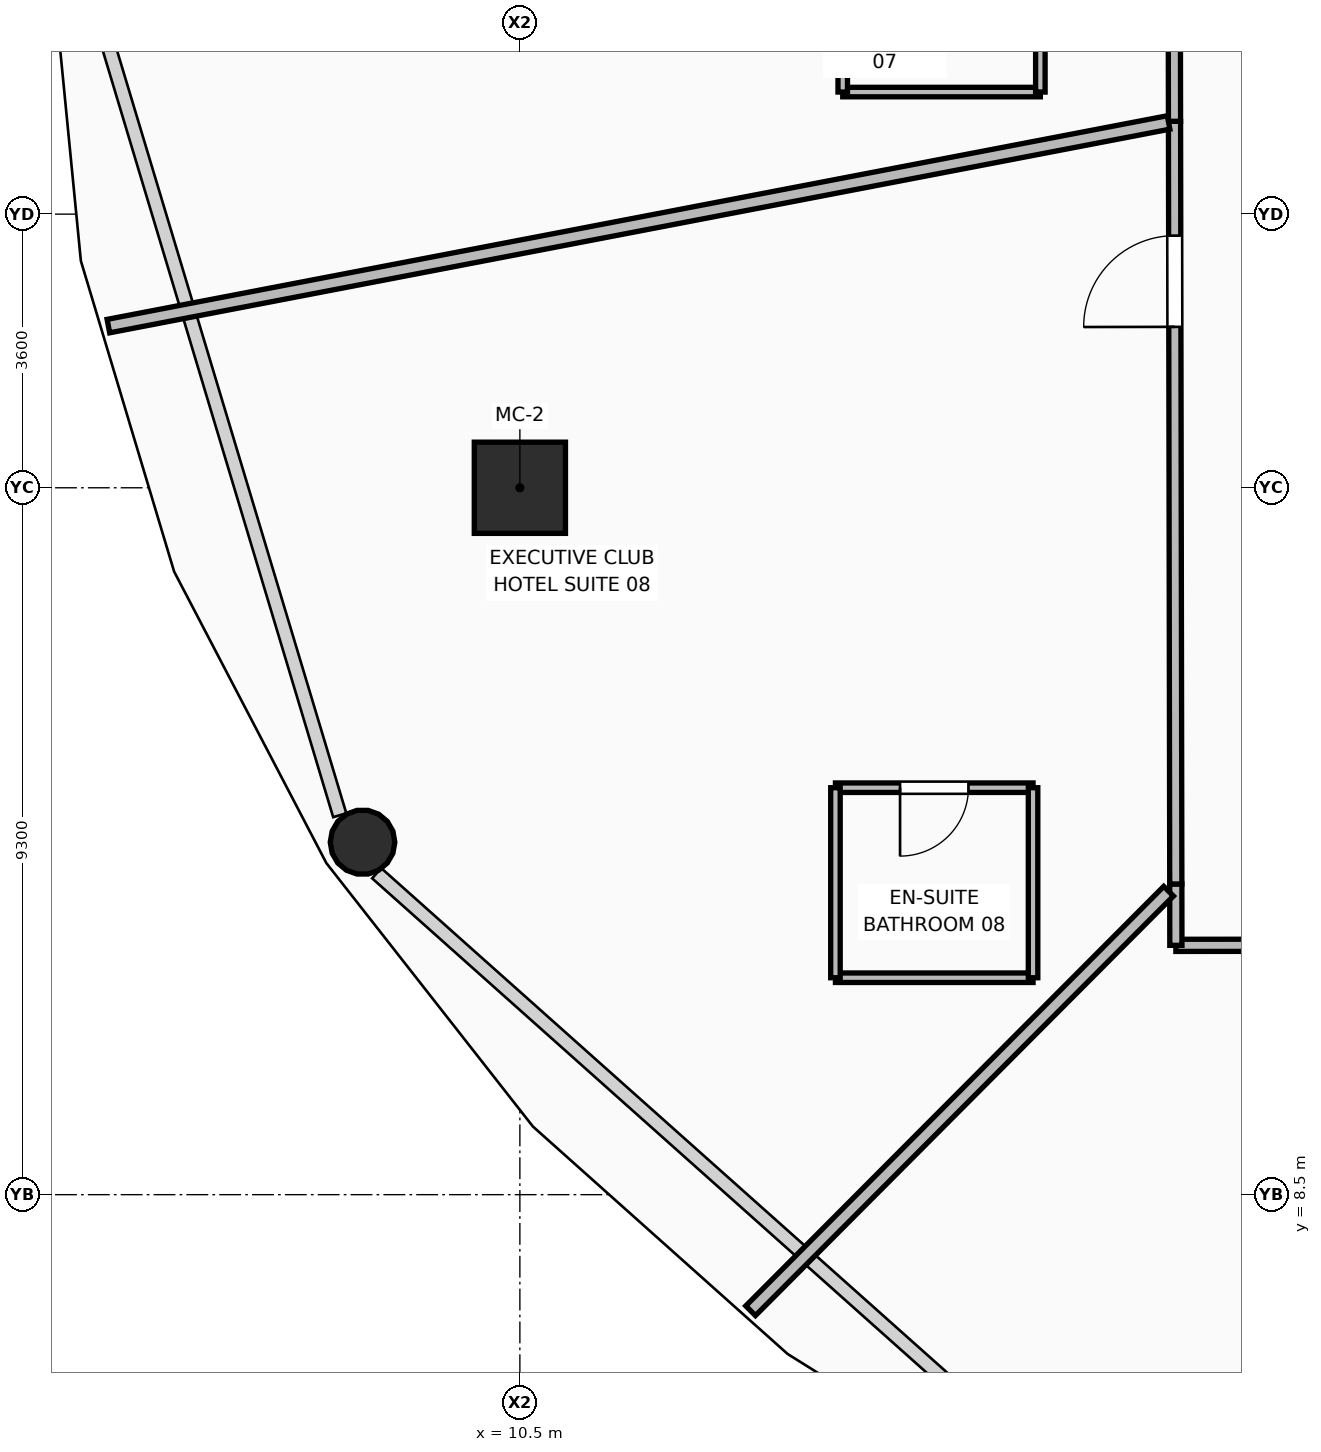
"""IFC4 building model, lengths in metres.
Left out: names, types, materials, properties, quantities, classifications, styles, units other than length and angle.
Written with IfcOpenShell. Run it as: python <this file> out.ifc"""

import sys

from ifc_helpers import new_model, si_unit, direction, frame, frame_2d, origin, origin_2d, place, context, subcontext, project, spatial, rectangle, hollow_rectangle, hollow_circle, extrude, element, fill, save


model = new_model("IFC4")
c1 = context("Model", 3, precision=1e-05, world=origin(), true_north=direction((0.0, 1.0)))
c2 = subcontext(c1, "Body", "Model", "MODEL_VIEW")
j1 = project(units=[si_unit("LENGTHUNIT", "METRE"), si_unit("PLANEANGLEUNIT", "RADIAN")], contexts=[c1])
p1 = place(None, origin())
s1 = spatial("IfcSite", under=j1, at=p1, CompositionType="ELEMENT")
p2 = place(p1, origin())
s2 = spatial("IfcBuilding", under=s1, at=p2, CompositionType="ELEMENT")
p3 = place(p2, frame((0.0, 0.0, 49.5)))
s3 = spatial("IfcBuildingStorey", under=s2, at=p3, CompositionType="ELEMENT", Elevation=49.5)
p4 = place(p3, frame((10.5, 17.8, 0.0), z_axis=(0.0, 0.0, 1.0), x_axis=(1.0, 0.0, 0.0)))
e1 = element("IfcColumn", 1, at=p4, inside=s3, PredefinedType="COLUMN", context=c2, shape_type="SweptSolid", body=[
    extrude(hollow_rectangle(XDim=1.2, YDim=1.2, WallThickness=0.045, at=origin_2d()), origin(), (0.0, 0.0, 1.0), 3.75),
])
p5 = place(p3, frame((8.43, 13.137, 0.0), z_axis=(0.0, 0.0, 1.0), x_axis=(1.0, 0.0, 0.0)))
e2 = element("IfcColumn", 2, at=p5, inside=s3, PredefinedType="COLUMN", context=c2, shape_type="SweptSolid", body=[
    extrude(hollow_circle(Radius=0.425, WallThickness=0.04, at=origin_2d()), origin(), (0.0, 0.0, 1.0), 3.57),
])
p6 = place(p3, frame((29.963, 11.787, 0.0), z_axis=(0.0, 0.0, 1.0), x_axis=(-0.999999786378, -0.000653638826, 0.0)))
e3 = element("IfcWall", 3, at=p6, inside=s3, PredefinedType="PARTITIONING", context=c2, shape_type="SweptSolid", body=[
    extrude(rectangle(XDim=10.832, YDim=0.16, at=frame_2d((5.416, 0.0))), origin(), (0.0, 0.0, 1.0), 2.928),
])
p7 = place(p6, frame((4.89, 0.0, 0.0)))
e4 = element("IfcOpeningElement", 4, at=p7, cuts=e3, PredefinedType="OPENING", context=c2, shape_type="SweptSolid", body=[
    extrude(rectangle(XDim=1.2, YDim=2.1, at=frame_2d((0.6, 1.05))), frame((0.0, 0.09, 0.0), z_axis=(0.0, -1.0, 0.0), x_axis=(1.0, 0.0, 0.0)), (0.0, 0.0, 1.0), 0.18),
])
p8 = place(p3, frame((19.131, 11.78, 0.0), z_axis=(0.0, 0.0, 1.0), x_axis=(-0.001512857573, 0.99999885563, 0.0)))
e5 = element("IfcWall", 5, at=p8, inside=s3, PredefinedType="PARTITIONING", context=c2, shape_type="SweptSolid", body=[
    extrude(rectangle(XDim=0.807, YDim=0.16, at=frame_2d((0.403, 0.0))), origin(), (0.0, 0.0, 1.0), 3.55),
])
p9 = place(p3, frame((19.13, 12.587, 0.0), z_axis=(0.0, 0.0, 1.0), x_axis=(-0.001678829751, 0.999998590764, 0.0)))
e6 = element("IfcWall", 6, at=p9, inside=s3, PredefinedType="PARTITIONING", context=c2, shape_type="SweptSolid", body=[
    extrude(rectangle(XDim=10.034, YDim=0.16, at=frame_2d((5.017, 0.0))), origin(), (0.0, 0.0, 1.0), 2.928),
])
p10 = place(p9, frame((7.33, 0.0, 0.0)))
e7 = element("IfcOpeningElement", 7, at=p10, cuts=e6, PredefinedType="OPENING", context=c2, shape_type="SweptSolid", body=[
    extrude(rectangle(XDim=1.2, YDim=2.1, at=frame_2d((0.6, 1.05))), frame((0.0, 0.09, 0.0), z_axis=(0.0, -1.0, 0.0), x_axis=(1.0, 0.0, 0.0)), (0.0, 0.0, 1.0), 0.18),
])
p11 = place(p3, frame((19.113, 22.621, 0.0), z_axis=(0.0, 0.0, 1.0), x_axis=(-0.001579153183, 0.999998753137, 0.0)))
e8 = element("IfcWall", 8, at=p11, inside=s3, PredefinedType="PARTITIONING", context=c2, shape_type="SweptSolid", body=[
    extrude(rectangle(XDim=1.237, YDim=0.16, at=frame_2d((0.618, 0.0))), origin(), (0.0, 0.0, 1.0), 3.55),
])
p12 = place(p3, frame((19.035, 22.606, 0.0), z_axis=(0.0, 0.0, 1.0), x_axis=(-0.982052637136, -0.188607046247, 0.0)))
e9 = element("IfcWall", 9, at=p12, inside=s3, PredefinedType="PARTITIONING", context=c2, shape_type="SweptSolid", body=[
    extrude(rectangle(XDim=14.204, YDim=0.18, at=frame_2d((7.102, 0.0))), origin(), (0.0, 0.0, 1.0), 2.775),
])
p13 = place(p3, frame((19.035, 12.492, 0.0), z_axis=(0.0, 0.0, 1.0), x_axis=(-0.705820822029, -0.708390405913, 0.0)))
e10 = element("IfcWall", 10, at=p13, inside=s3, PredefinedType="PARTITIONING", context=c2, shape_type="SweptSolid", body=[
    extrude(rectangle(XDim=7.791, YDim=0.18, at=frame_2d((3.896, 0.0))), origin(), (0.0, 0.0, 1.0), 2.775),
])
p14 = place(p3, frame((14.748, 23.006, 0.0), z_axis=(0.0, 0.0, 1.0), x_axis=(1.0, 0.0, 0.0)))
e11 = element("IfcWall", 11, at=p14, inside=s3, PredefinedType="PARTITIONING", context=c2, shape_type="SweptSolid", body=[
    extrude(rectangle(XDim=2.6, YDim=0.125, at=frame_2d((1.3, 0.0))), origin(), (0.0, 0.0, 1.0), 3.55),
])
p15 = place(p3, frame((14.748, 23.006, 0.0), z_axis=(0.0, 0.0, 1.0), x_axis=(0.0, 1.0, 0.0)))
e12 = element("IfcWall", 12, at=p15, inside=s3, PredefinedType="PARTITIONING", context=c2, shape_type="SweptSolid", body=[
    extrude(rectangle(XDim=2.5, YDim=0.125, at=frame_2d((1.25, 0.0))), origin(), (0.0, 0.0, 1.0), 3.55),
])
p16 = place(p3, frame((17.348, 23.006, 0.0), z_axis=(0.0, 0.0, 1.0), x_axis=(0.0, 1.0, 0.0)))
e13 = element("IfcWall", 13, at=p16, inside=s3, PredefinedType="PARTITIONING", context=c2, shape_type="SweptSolid", body=[
    extrude(rectangle(XDim=2.5, YDim=0.125, at=frame_2d((1.25, 0.0))), origin(), (0.0, 0.0, 1.0), 3.55),
])
p17 = place(p16, frame((0.8, 0.0, 0.0)))
e14 = element("IfcOpeningElement", 14, at=p17, cuts=e13, PredefinedType="OPENING", context=c2, shape_type="SweptSolid", body=[
    extrude(rectangle(XDim=0.9, YDim=2.1, at=frame_2d((0.45, 1.05))), frame((0.0, 0.073, 0.0), z_axis=(0.0, -1.0, 0.0), x_axis=(1.0, 0.0, 0.0)), (0.0, 0.0, 1.0), 0.145),
])
p18 = place(p3, frame((14.652, 11.354, 0.0), z_axis=(0.0, 0.0, 1.0), x_axis=(1.0, 0.0, 0.0)))
e15 = element("IfcWall", 15, at=p18, inside=s3, PredefinedType="PARTITIONING", context=c2, shape_type="SweptSolid", body=[
    extrude(rectangle(XDim=2.6, YDim=0.125, at=frame_2d((1.3, 0.0))), origin(), (0.0, 0.0, 1.0), 3.55),
])
p19 = place(p3, frame((14.652, 13.854, 0.0), z_axis=(0.0, 0.0, 1.0), x_axis=(1.0, 0.0, 0.0)))
e16 = element("IfcWall", 16, at=p19, inside=s3, PredefinedType="PARTITIONING", context=c2, shape_type="SweptSolid", body=[
    extrude(rectangle(XDim=2.6, YDim=0.125, at=frame_2d((1.3, 0.0))), origin(), (0.0, 0.0, 1.0), 3.55),
])
p20 = place(p19, frame((0.85, 0.0, 0.0)))
e17 = element("IfcOpeningElement", 17, at=p20, cuts=e16, PredefinedType="OPENING", context=c2, shape_type="SweptSolid", body=[
    extrude(rectangle(XDim=0.9, YDim=2.1, at=frame_2d((0.45, 1.05))), frame((0.0, 0.073, 0.0), z_axis=(0.0, -1.0, 0.0), x_axis=(1.0, 0.0, 0.0)), (0.0, 0.0, 1.0), 0.145),
])
for number, where, z_axis, x_axis in (
    (18, (14.652, 11.354, 0.0), (0.0, 0.0, 1.0), (0.0, 1.0, 0.0)),
    (19, (17.252, 11.354, 0.0), (0.0, 0.0, 1.0), (0.0, 1.0, 0.0)),
):
    element("IfcWall", number, at=place(p3, frame(where, z_axis=z_axis, x_axis=x_axis)), inside=s3, PredefinedType="PARTITIONING", context=c2, shape_type="SweptSolid", body=[
        extrude(rectangle(XDim=2.5, YDim=0.125, at=frame_2d((1.25, 0.0))), origin(), (0.0, 0.0, 1.0), 3.55),
    ])
p21 = place(p20, frame((0.9, 0.0, 0.0), z_axis=(0.0, 0.0, 1.0), x_axis=(-1.0, 0.0, 0.0)))
e20 = element("IfcDoor", 20, at=p21, inside=s3, OperationType="SINGLE_SWING_RIGHT", PredefinedType="DOOR", context=c2, shape_type="SweptSolid", body=[
    extrude(rectangle(XDim=0.9, YDim=2.1, at=frame_2d((0.45, 1.05))), frame((0.0, 0.025, 0.0), z_axis=(0.0, -1.0, 0.0), x_axis=(1.0, 0.0, 0.0)), (0.0, 0.0, 1.0), 0.05),
])
fill(e17, e20)
p22 = place(p10, origin())
e21 = element("IfcDoor", 21, at=p22, inside=s3, OperationType="SINGLE_SWING_LEFT", PredefinedType="DOOR", context=c2, shape_type="SweptSolid", body=[
    extrude(rectangle(XDim=1.2, YDim=2.1, at=frame_2d((0.6, 1.05))), frame((0.0, 0.025, 0.0), z_axis=(0.0, -1.0, 0.0), x_axis=(1.0, 0.0, 0.0)), (0.0, 0.0, 1.0), 0.05),
])
fill(e7, e21)
save(model, sys.argv[1])
